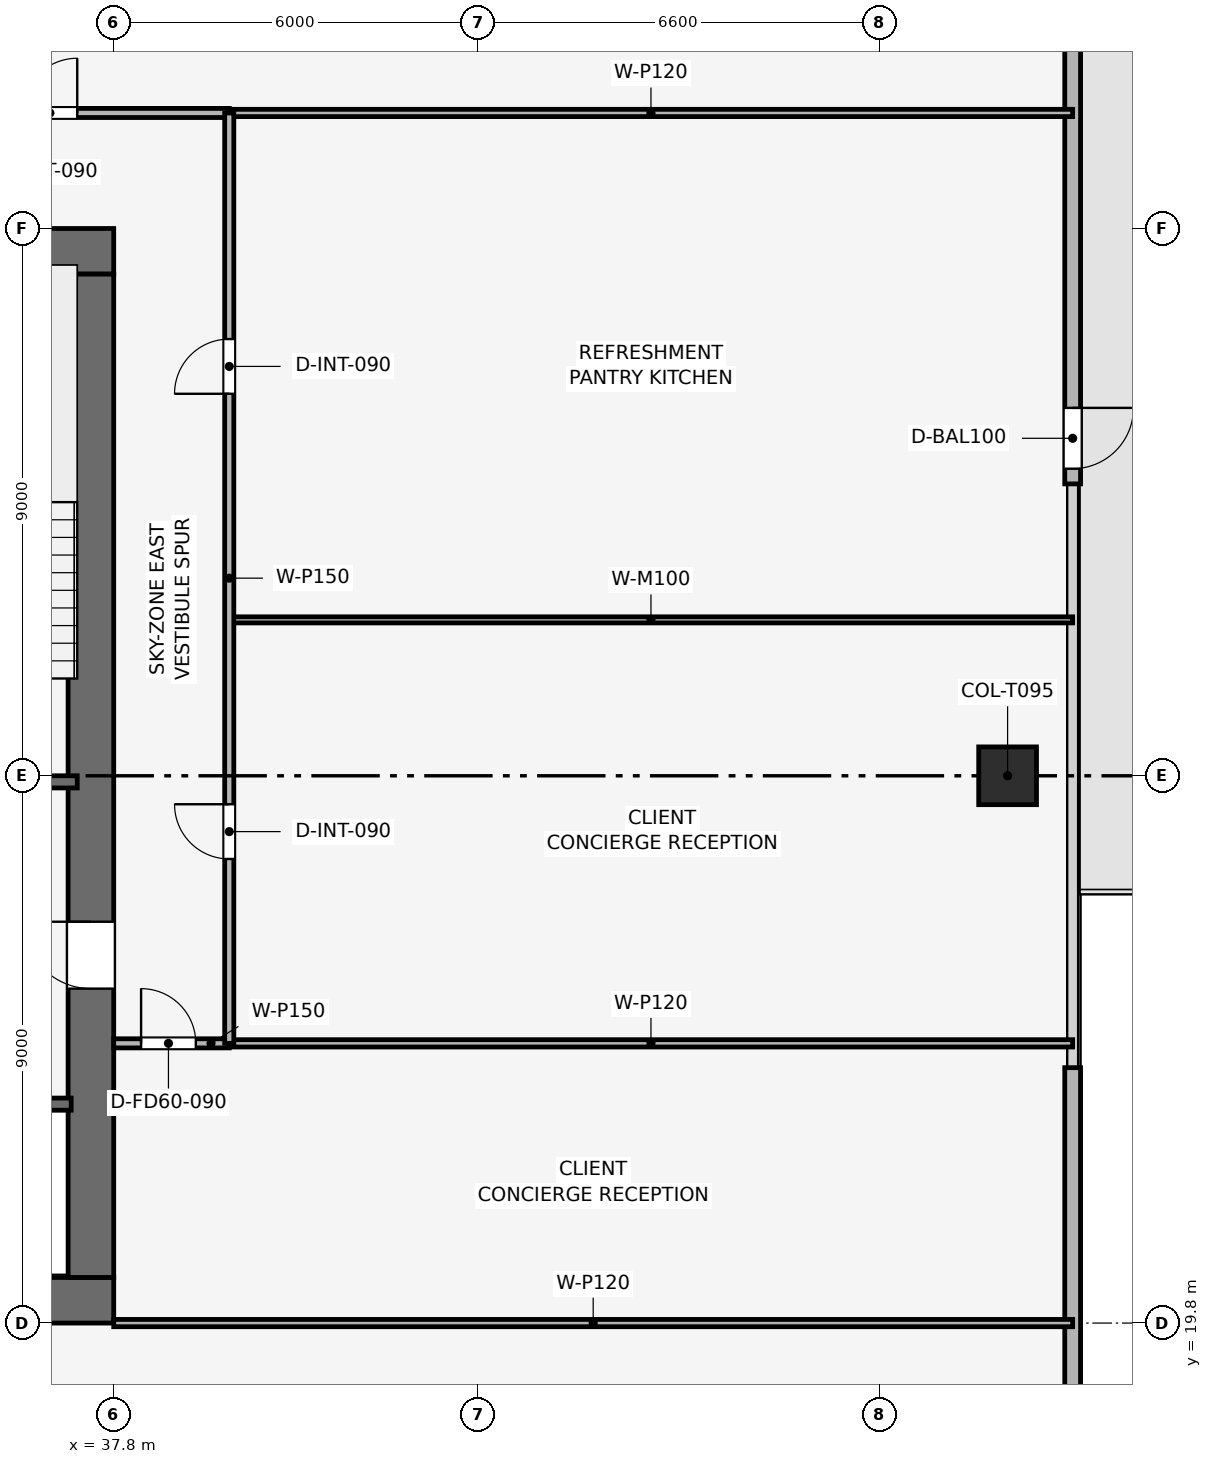
"""IFC4 building model, lengths in metres.
Left out: names, types, materials, properties, quantities, classifications, styles, units other than length and angle.
Written with IfcOpenShell. Run it as: python <this file> out.ifc"""

import sys

from ifc_helpers import new_model, si_unit, direction, frame, frame_2d, origin, origin_2d, place, context, subcontext, project, spatial, rectangle, extrude, element, fill, save


model = new_model("IFC4")
c1 = context("Model", 3, precision=1e-05, world=origin(), true_north=direction((0.0, 1.0)))
c2 = subcontext(c1, "Body", "Model", "MODEL_VIEW")
j1 = project(units=[si_unit("LENGTHUNIT", "METRE"), si_unit("PLANEANGLEUNIT", "RADIAN")], contexts=[c1])
p1 = place(None, origin())
s1 = spatial("IfcSite", under=j1, at=p1, CompositionType="ELEMENT")
p2 = place(p1, origin())
s2 = spatial("IfcBuilding", under=s1, at=p2, CompositionType="ELEMENT")
p3 = place(p2, frame((0.0, 0.0, 257.85)))
s3 = spatial("IfcBuildingStorey", under=s2, at=p3, CompositionType="ELEMENT", Elevation=257.85)
p4 = place(p3, frame((19.8, 20.175, 0.0), z_axis=(0.0, 0.0, 1.0), x_axis=(1.0, 0.0, 0.0)))
e1 = element("IfcWall", 1, at=p4, inside=s3, PredefinedType="SHEAR", context=c2, shape_type="SweptSolid", body=[
    extrude(rectangle(XDim=18.0, YDim=0.75, at=frame_2d((9.0, 0.0))), origin(), (0.0, 0.0, 1.0), 3.75),
])
p5 = place(p3, frame((19.8, 37.425, 0.0), z_axis=(0.0, 0.0, 1.0), x_axis=(1.0, 0.0, 0.0)))
e2 = element("IfcWall", 2, at=p5, inside=s3, PredefinedType="SHEAR", context=c2, shape_type="SweptSolid", body=[
    extrude(rectangle(XDim=18.0, YDim=0.75, at=frame_2d((9.0, 0.0))), origin(), (0.0, 0.0, 1.0), 3.75),
])
p6 = place(p5, frame((7.05, 0.0, 0.0)))
e3 = element("IfcOpeningElement", 3, at=p6, cuts=e2, PredefinedType="OPENING", context=c2, shape_type="SweptSolid", body=[
    extrude(rectangle(XDim=1.1, YDim=2.15, at=frame_2d((0.55, 1.075))), frame((0.0, 0.385, 0.0), z_axis=(0.0, -1.0, 0.0), x_axis=(1.0, 0.0, 0.0)), (0.0, 0.0, 1.0), 0.77),
])
p7 = place(p3, frame((37.425, 20.55, 0.0), z_axis=(0.0, 0.0, 1.0), x_axis=(0.0, 1.0, 0.0)))
e4 = element("IfcWall", 4, at=p7, inside=s3, PredefinedType="SHEAR", context=c2, shape_type="SweptSolid", body=[
    extrude(rectangle(XDim=16.5, YDim=0.75, at=frame_2d((8.25, 0.0))), origin(), (0.0, 0.0, 1.0), 3.75),
])
p8 = place(p7, frame((4.75, 0.0, 0.0)))
e5 = element("IfcOpeningElement", 5, at=p8, cuts=e4, PredefinedType="OPENING", context=c2, shape_type="SweptSolid", body=[
    extrude(rectangle(XDim=1.1, YDim=2.15, at=frame_2d((0.55, 1.075))), frame((0.0, 0.385, 0.0), z_axis=(0.0, -1.0, 0.0), x_axis=(1.0, 0.0, 0.0)), (0.0, 0.0, 1.0), 0.77),
])
p9 = place(p3, frame((52.5, 28.8, 0.003), z_axis=(0.0, 0.0, 1.0), x_axis=(1.0, 0.0, 0.0)))
e6 = element("IfcColumn", 6, at=p9, inside=s3, PredefinedType="COLUMN", context=c2, shape_type="SweptSolid", body=[
    extrude(rectangle(XDim=0.95, YDim=0.95, at=origin_2d()), origin(), (0.0, 0.0, 1.0), 3.494),
])
p10 = place(p3, frame((53.57, 46.8, 0.0), z_axis=(0.0, 0.0, 1.0), x_axis=(0.0, -1.0, 0.0)))
e7 = element("IfcWall", 7, at=p10, inside=s3, PredefinedType="SOLIDWALL", context=c2, shape_type="SweptSolid", body=[
    extrude(rectangle(XDim=13.2, YDim=0.26, at=frame_2d((6.6, 0.0))), origin(), (0.0, 0.0, 1.0), 3.5),
])
p11 = place(p10, frame((11.95, 0.0, 0.0)))
e8 = element("IfcOpeningElement", 8, at=p11, cuts=e7, PredefinedType="OPENING", context=c2, shape_type="SweptSolid", body=[
    extrude(rectangle(XDim=1.0, YDim=2.2, at=frame_2d((0.5, 1.1))), frame((0.0, 0.14, 0.0), z_axis=(0.0, -1.0, 0.0), x_axis=(1.0, 0.0, 0.0)), (0.0, 0.0, 1.0), 0.28),
])
p12 = place(p3, frame((53.57, 24.0, 0.0), z_axis=(0.0, 0.0, 1.0), x_axis=(0.0, -1.0, 0.0)))
e9 = element("IfcWall", 9, at=p12, inside=s3, PredefinedType="SOLIDWALL", context=c2, shape_type="SweptSolid", body=[
    extrude(rectangle(XDim=13.2, YDim=0.26, at=frame_2d((6.6, 0.0))), origin(), (0.0, 0.0, 1.0), 3.5),
])
p13 = place(p12, frame((11.75, 0.0, 0.9)))
e10 = element("IfcOpeningElement", 10, at=p13, cuts=e9, PredefinedType="OPENING", context=c2, shape_type="SweptSolid", body=[
    extrude(rectangle(XDim=1.2, YDim=2.1, at=frame_2d((0.6, 1.05))), frame((0.0, 0.14, 0.0), z_axis=(0.0, -1.0, 0.0), x_axis=(1.0, 0.0, 0.0)), (0.0, 0.0, 1.0), 0.28),
])
p14 = place(p3, frame((34.05, 28.7, 0.0), z_axis=(0.0, 0.0, 1.0), x_axis=(1.0, 0.0, 0.0)))
e11 = element("IfcWall", 11, at=p14, inside=s3, PredefinedType="SHEAR", context=c2, shape_type="SweptSolid", body=[
    extrude(rectangle(XDim=3.15, YDim=0.2, at=frame_2d((1.575, 0.0))), origin(), (0.0, 0.0, 1.0), 3.5),
])
p15 = place(p14, frame((0.8, 0.0, 0.0)))
e12 = element("IfcOpeningElement", 12, at=p15, cuts=e11, PredefinedType="OPENING", context=c2, shape_type="SweptSolid", body=[
    extrude(rectangle(XDim=1.0, YDim=2.1, at=frame_2d((0.5, 1.05))), frame((0.0, 0.11, 0.0), z_axis=(0.0, -1.0, 0.0), x_axis=(1.0, 0.0, 0.0)), (0.0, 0.0, 1.0), 0.22),
])
p16 = place(p3, frame((34.05, 23.4, 0.0), z_axis=(0.0, 0.0, 1.0), x_axis=(1.0, 0.0, 0.0)))
e13 = element("IfcWall", 13, at=p16, inside=s3, PredefinedType="SHEAR", context=c2, shape_type="SweptSolid", body=[
    extrude(rectangle(XDim=3.05, YDim=0.2, at=frame_2d((1.525, 0.0))), origin(), (0.0, 0.0, 1.0), 3.5),
])
p17 = place(p16, frame((1.2, 0.0, 0.0)))
e14 = element("IfcOpeningElement", 14, at=p17, cuts=e13, PredefinedType="OPENING", context=c2, shape_type="SweptSolid", body=[
    extrude(rectangle(XDim=1.1, YDim=2.15, at=frame_2d((0.55, 1.075))), frame((0.0, 0.11, 0.0), z_axis=(0.0, -1.0, 0.0), x_axis=(1.0, 0.0, 0.0)), (0.0, 0.0, 1.0), 0.22),
])
p18 = place(p3, frame((37.8, 19.8, 0.0), z_axis=(0.0, 0.0, 1.0), x_axis=(1.0, 0.0, 0.0)))
e15 = element("IfcWall", 15, at=p18, inside=s3, PredefinedType="PARTITIONING", context=c2, shape_type="SweptSolid", body=[
    extrude(rectangle(XDim=15.77, YDim=0.12, at=frame_2d((7.885, 0.0))), origin(), (0.0, 0.0, 1.0), 3.085),
])
p19 = place(p3, frame((37.8, 24.4, 0.0), z_axis=(0.0, 0.0, 1.0), x_axis=(1.0, 0.0, 0.0)))
e16 = element("IfcWall", 16, at=p19, inside=s3, PredefinedType="PARTITIONING", context=c2, shape_type="SweptSolid", body=[
    extrude(rectangle(XDim=1.9, YDim=0.15, at=frame_2d((0.95, 0.0))), origin(), (0.0, 0.0, 1.0), 3.5),
])
p20 = place(p19, frame((0.45, 0.0, 0.0)))
e17 = element("IfcOpeningElement", 17, at=p20, cuts=e16, PredefinedType="OPENING", context=c2, shape_type="SweptSolid", body=[
    extrude(rectangle(XDim=0.9, YDim=2.1, at=frame_2d((0.45, 1.05))), frame((0.0, 0.085, 0.0), z_axis=(0.0, -1.0, 0.0), x_axis=(1.0, 0.0, 0.0)), (0.0, 0.0, 1.0), 0.17),
])
p21 = place(p3, frame((39.7, 24.4, 0.0), z_axis=(0.0, 0.0, 1.0), x_axis=(1.0, 0.0, 0.0)))
e18 = element("IfcWall", 18, at=p21, inside=s3, PredefinedType="PARTITIONING", context=c2, shape_type="SweptSolid", body=[
    extrude(rectangle(XDim=13.87, YDim=0.12, at=frame_2d((6.935, 0.0))), origin(), (0.0, 0.0, 1.0), 3.085),
])
p22 = place(p3, frame((39.7, 31.364, 0.0), z_axis=(0.0, 0.0, 1.0), x_axis=(1.0, 0.0, 0.0)))
e19 = element("IfcWall", 19, at=p22, inside=s3, PredefinedType="MOVABLE", context=c2, shape_type="SweptSolid", body=[
    extrude(rectangle(XDim=13.87, YDim=0.1, at=frame_2d((6.935, 0.0))), origin(), (0.0, 0.0, 1.0), 3.085),
])
p23 = place(p3, frame((39.7, 39.7, 0.0), z_axis=(0.0, 0.0, 1.0), x_axis=(1.0, 0.0, 0.0)))
e20 = element("IfcWall", 20, at=p23, inside=s3, PredefinedType="PARTITIONING", context=c2, shape_type="SweptSolid", body=[
    extrude(rectangle(XDim=13.87, YDim=0.12, at=frame_2d((6.935, 0.0))), origin(), (0.0, 0.0, 1.0), 3.085),
])
p24 = place(p3, frame((17.9, 39.7, 0.0), z_axis=(0.0, 0.0, 1.0), x_axis=(1.0, 0.0, 0.0)))
e21 = element("IfcWall", 21, at=p24, inside=s3, PredefinedType="PARTITIONING", context=c2, shape_type="SweptSolid", body=[
    extrude(rectangle(XDim=21.8, YDim=0.15, at=frame_2d((10.9, 0.0))), origin(), (0.0, 0.0, 1.0), 3.085),
])
p25 = place(p24, frame((3.3, 0.0, 0.0)))
e22 = element("IfcOpeningElement", 22, at=p25, cuts=e21, PredefinedType="OPENING", context=c2, shape_type="SweptSolid", body=[
    extrude(rectangle(XDim=0.9, YDim=2.1, at=frame_2d((0.45, 1.05))), frame((0.0, 0.085, 0.0), z_axis=(0.0, -1.0, 0.0), x_axis=(1.0, 0.0, 0.0)), (0.0, 0.0, 1.0), 0.17),
])
p26 = place(p24, frame((8.45, 0.0, 0.0)))
e23 = element("IfcOpeningElement", 23, at=p26, cuts=e21, PredefinedType="OPENING", context=c2, shape_type="SweptSolid", body=[
    extrude(rectangle(XDim=0.9, YDim=2.1, at=frame_2d((0.45, 1.05))), frame((0.0, 0.085, 0.0), z_axis=(0.0, -1.0, 0.0), x_axis=(1.0, 0.0, 0.0)), (0.0, 0.0, 1.0), 0.17),
])
p27 = place(p24, frame((11.35, 0.0, 0.0)))
e24 = element("IfcOpeningElement", 24, at=p27, cuts=e21, PredefinedType="OPENING", context=c2, shape_type="SweptSolid", body=[
    extrude(rectangle(XDim=0.9, YDim=2.1, at=frame_2d((0.45, 1.05))), frame((0.0, 0.085, 0.0), z_axis=(0.0, -1.0, 0.0), x_axis=(1.0, 0.0, 0.0)), (0.0, 0.0, 1.0), 0.17),
])
p28 = place(p24, frame((14.1, 0.0, 0.0)))
e25 = element("IfcOpeningElement", 25, at=p28, cuts=e21, PredefinedType="OPENING", context=c2, shape_type="SweptSolid", body=[
    extrude(rectangle(XDim=0.95, YDim=2.1, at=frame_2d((0.475, 1.05))), frame((0.0, 0.085, 0.0), z_axis=(0.0, -1.0, 0.0), x_axis=(1.0, 0.0, 0.0)), (0.0, 0.0, 1.0), 0.17),
])
p29 = place(p24, frame((18.4, 0.0, 0.0)))
e26 = element("IfcOpeningElement", 26, at=p29, cuts=e21, PredefinedType="OPENING", context=c2, shape_type="SweptSolid", body=[
    extrude(rectangle(XDim=0.9, YDim=2.1, at=frame_2d((0.45, 1.05))), frame((0.0, 0.085, 0.0), z_axis=(0.0, -1.0, 0.0), x_axis=(1.0, 0.0, 0.0)), (0.0, 0.0, 1.0), 0.17),
])
p30 = place(p3, frame((39.7, 24.4, 0.0), z_axis=(0.0, 0.0, 1.0), x_axis=(0.0, 1.0, 0.0)))
e27 = element("IfcWall", 27, at=p30, inside=s3, PredefinedType="PARTITIONING", context=c2, shape_type="SweptSolid", body=[
    extrude(rectangle(XDim=15.3, YDim=0.15, at=frame_2d((7.65, 0.0))), origin(), (0.0, 0.0, 1.0), 3.085),
])
p31 = place(p30, frame((3.032, 0.0, 0.0)))
e28 = element("IfcOpeningElement", 28, at=p31, cuts=e27, PredefinedType="OPENING", context=c2, shape_type="SweptSolid", body=[
    extrude(rectangle(XDim=0.9, YDim=2.1, at=frame_2d((0.45, 1.05))), frame((0.0, 0.085, 0.0), z_axis=(0.0, -1.0, 0.0), x_axis=(1.0, 0.0, 0.0)), (0.0, 0.0, 1.0), 0.17),
])
p32 = place(p30, frame((10.682, 0.0, 0.0)))
e29 = element("IfcOpeningElement", 29, at=p32, cuts=e27, PredefinedType="OPENING", context=c2, shape_type="SweptSolid", body=[
    extrude(rectangle(XDim=0.9, YDim=2.1, at=frame_2d((0.45, 1.05))), frame((0.0, 0.085, 0.0), z_axis=(0.0, -1.0, 0.0), x_axis=(1.0, 0.0, 0.0)), (0.0, 0.0, 1.0), 0.17),
])
p33 = place(p11, origin())
e30 = element("IfcDoor", 30, at=p33, inside=s3, OperationType="SINGLE_SWING_LEFT", PredefinedType="DOOR", context=c2, shape_type="SweptSolid", body=[
    extrude(rectangle(XDim=1.0, YDim=2.2, at=frame_2d((0.5, 1.1))), frame((0.0, 0.025, 0.0), z_axis=(0.0, -1.0, 0.0), x_axis=(1.0, 0.0, 0.0)), (0.0, 0.0, 1.0), 0.05),
])
fill(e8, e30)
p34 = place(p20, origin())
e31 = element("IfcDoor", 31, at=p34, inside=s3, OperationType="SINGLE_SWING_LEFT", PredefinedType="DOOR", context=c2, shape_type="SweptSolid", body=[
    extrude(rectangle(XDim=0.9, YDim=2.1, at=frame_2d((0.45, 1.05))), frame((0.0, 0.025, 0.0), z_axis=(0.0, -1.0, 0.0), x_axis=(1.0, 0.0, 0.0)), (0.0, 0.0, 1.0), 0.05),
])
fill(e17, e31)
p35 = place(p29, origin())
e32 = element("IfcDoor", 32, at=p35, inside=s3, OperationType="SINGLE_SWING_RIGHT", PredefinedType="DOOR", context=c2, shape_type="SweptSolid", body=[
    extrude(rectangle(XDim=0.9, YDim=2.1, at=frame_2d((0.45, 1.05))), frame((0.0, 0.025, 0.0), z_axis=(0.0, -1.0, 0.0), x_axis=(1.0, 0.0, 0.0)), (0.0, 0.0, 1.0), 0.05),
])
fill(e26, e32)
p36 = place(p31, origin())
e33 = element("IfcDoor", 33, at=p36, inside=s3, OperationType="SINGLE_SWING_RIGHT", PredefinedType="DOOR", context=c2, shape_type="SweptSolid", body=[
    extrude(rectangle(XDim=0.9, YDim=2.1, at=frame_2d((0.45, 1.05))), frame((0.0, 0.025, 0.0), z_axis=(0.0, -1.0, 0.0), x_axis=(1.0, 0.0, 0.0)), (0.0, 0.0, 1.0), 0.05),
])
fill(e28, e33)
p37 = place(p32, origin())
e34 = element("IfcDoor", 34, at=p37, inside=s3, OperationType="SINGLE_SWING_LEFT", PredefinedType="DOOR", context=c2, shape_type="SweptSolid", body=[
    extrude(rectangle(XDim=0.9, YDim=2.1, at=frame_2d((0.45, 1.05))), frame((0.0, 0.025, 0.0), z_axis=(0.0, -1.0, 0.0), x_axis=(1.0, 0.0, 0.0)), (0.0, 0.0, 1.0), 0.05),
])
fill(e29, e34)
p38 = place(p8, origin())
e35 = element("IfcDoor", 35, at=p38, inside=s3, OperationType="SINGLE_SWING_RIGHT", PredefinedType="DOOR", context=c2, shape_type="SweptSolid", body=[
    extrude(rectangle(XDim=1.1, YDim=2.15, at=frame_2d((0.55, 1.075))), frame((0.0, 0.025, 0.0), z_axis=(0.0, -1.0, 0.0), x_axis=(1.0, 0.0, 0.0)), (0.0, 0.0, 1.0), 0.05),
])
fill(e5, e35)
save(model, sys.argv[1])
